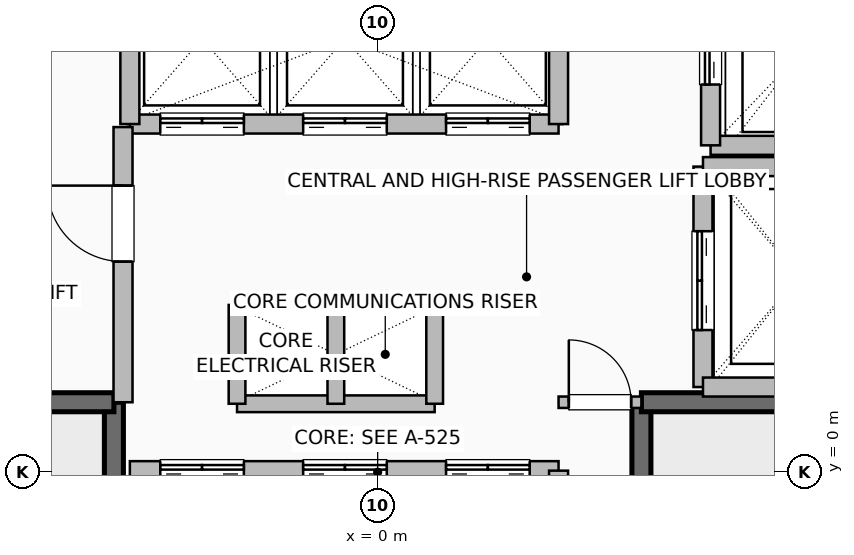
"""IFC4 building model, lengths in metres.
Left out: names, types, materials, properties, quantities, classifications, styles, units other than length and angle.
Written with IfcOpenShell. Run it as: python <this file> out.ifc"""

import sys

from ifc_helpers import new_model, si_unit, direction, frame, frame_2d, origin, place, context, subcontext, project, spatial, rectangle, extrude, element, fill, save


model = new_model("IFC4")
c1 = context("Model", 3, precision=1e-05, world=origin(), true_north=direction((0.0, 1.0)))
c2 = subcontext(c1, "Body", "Model", "MODEL_VIEW")
j1 = project(units=[si_unit("LENGTHUNIT", "METRE"), si_unit("PLANEANGLEUNIT", "RADIAN")], contexts=[c1])
p1 = place(None, origin())
s1 = spatial("IfcSite", under=j1, at=p1, CompositionType="ELEMENT")
p2 = place(p1, origin())
s2 = spatial("IfcBuilding", under=s1, at=p2, CompositionType="ELEMENT")
p3 = place(p2, frame((0.0, 0.0, 97.6)))
s3 = spatial("IfcBuildingStorey", under=s2, at=p3, CompositionType="ELEMENT", Elevation=97.6)
p4 = place(p3, frame((-3.47, -6.8, 0.0), z_axis=(0.0, 0.0, 1.0), x_axis=(0.0, 1.0, 0.0)))
e1 = element("IfcWall", 1, at=p4, inside=s3, PredefinedType="SHEAR", context=c2, shape_type="SweptSolid", body=[
    extrude(rectangle(XDim=7.72, YDim=0.25, at=frame_2d((3.86, 0.0))), origin(), (0.0, 0.0, 1.0), 3.36),
])
p5 = place(p3, frame((-6.8, 0.92, 0.0), z_axis=(0.0, 0.0, 1.0), x_axis=(1.0, 0.0, 0.0)))
e2 = element("IfcWall", 2, at=p5, inside=s3, PredefinedType="SHEAR", context=c2, shape_type="SweptSolid", body=[
    extrude(rectangle(XDim=3.33, YDim=0.25, at=frame_2d((1.665, 0.0))), origin(), (0.0, 0.0, 1.0), 3.36),
])
p6 = place(p3, frame((3.47, -6.8, 0.0), z_axis=(0.0, 0.0, 1.0), x_axis=(0.0, 1.0, 0.0)))
e3 = element("IfcWall", 3, at=p6, inside=s3, PredefinedType="SHEAR", context=c2, shape_type="SweptSolid", body=[
    extrude(rectangle(XDim=7.72, YDim=0.25, at=frame_2d((3.86, 0.0))), origin(), (0.0, 0.0, 1.0), 3.36),
])
p7 = place(p3, frame((3.47, 0.92, 0.0), z_axis=(0.0, 0.0, 1.0), x_axis=(1.0, 0.0, 0.0)))
e4 = element("IfcWall", 4, at=p7, inside=s3, PredefinedType="SHEAR", context=c2, shape_type="SweptSolid", body=[
    extrude(rectangle(XDim=3.33, YDim=0.25, at=frame_2d((1.665, 0.0))), origin(), (0.0, 0.0, 1.0), 3.36),
])
for number, where, z_axis, x_axis in (
    (5, (-1.85, 2.2, 0.0), (0.0, 0.0, 1.0), (1.0, 0.0, 0.0)),
    (6, (-1.85, 0.9, 0.0), (0.0, 0.0, 1.0), (1.0, 0.0, 0.0)),
):
    element("IfcWall", number, at=place(p3, frame(where, z_axis=z_axis, x_axis=x_axis)), inside=s3, PredefinedType="PARTITIONING", context=c2, shape_type="SweptSolid", body=[
        extrude(rectangle(XDim=2.6, YDim=0.22, at=frame_2d((1.3, 0.0))), origin(), (0.0, 0.0, 1.0), 3.36),
    ])
for number, where, z_axis, x_axis in (
    (7, (-0.55, 0.9, 0.0), (0.0, 0.0, 1.0), (0.0, 1.0, 0.0)),
    (8, (0.75, 0.9, 0.0), (0.0, 0.0, 1.0), (0.0, 1.0, 0.0)),
    (9, (-1.85, 0.9, 0.0), (0.0, 0.0, 1.0), (0.0, 1.0, 0.0)),
):
    element("IfcWall", number, at=place(p3, frame(where, z_axis=z_axis, x_axis=x_axis)), inside=s3, PredefinedType="PARTITIONING", context=c2, shape_type="SweptSolid", body=[
        extrude(rectangle(XDim=1.3, YDim=0.22, at=frame_2d((0.65, 0.0))), origin(), (0.0, 0.0, 1.0), 3.36),
    ])
p8 = place(p3, frame((-3.26, 0.02, 0.0), z_axis=(0.0, 0.0, 1.0), x_axis=(1.0, 0.0, 0.0)))
e10 = element("IfcWall", 10, at=p8, inside=s3, PredefinedType="SHEAR", context=c2, shape_type="SweptSolid", body=[
    extrude(rectangle(XDim=5.64, YDim=0.25, at=frame_2d((2.82, 0.0))), origin(), (0.0, 0.0, 1.0), 3.36),
])
p9 = place(p8, frame((0.4, 0.0, 0.0)))
e11 = element("IfcOpeningElement", 11, at=p9, cuts=e10, PredefinedType="OPENING", context=c2, shape_type="SweptSolid", body=[
    extrude(rectangle(XDim=1.1, YDim=2.2, at=frame_2d((0.55, 1.1))), frame((0.0, 0.135, 0.0), z_axis=(0.0, -1.0, 0.0), x_axis=(1.0, 0.0, 0.0)), (0.0, 0.0, 1.0), 0.27),
])
p10 = place(p8, frame((2.28, 0.0, 0.0)))
e12 = element("IfcOpeningElement", 12, at=p10, cuts=e10, PredefinedType="OPENING", context=c2, shape_type="SweptSolid", body=[
    extrude(rectangle(XDim=1.1, YDim=2.2, at=frame_2d((0.55, 1.1))), frame((0.0, 0.135, 0.0), z_axis=(0.0, -1.0, 0.0), x_axis=(1.0, 0.0, 0.0)), (0.0, 0.0, 1.0), 0.27),
])
p11 = place(p8, frame((4.16, 0.0, 0.0)))
e13 = element("IfcOpeningElement", 13, at=p11, cuts=e10, PredefinedType="OPENING", context=c2, shape_type="SweptSolid", body=[
    extrude(rectangle(XDim=1.1, YDim=2.2, at=frame_2d((0.55, 1.1))), frame((0.0, 0.135, 0.0), z_axis=(0.0, -1.0, 0.0), x_axis=(1.0, 0.0, 0.0)), (0.0, 0.0, 1.0), 0.27),
])
p12 = place(p3, frame((2.38, -2.42, 0.0), z_axis=(0.0, 0.0, 1.0), x_axis=(0.0, 1.0, 0.0)))
e14 = element("IfcWall", 14, at=p12, inside=s3, PredefinedType="SHEAR", context=c2, shape_type="SweptSolid", body=[
    extrude(rectangle(XDim=2.44, YDim=0.25, at=frame_2d((1.22, 0.0))), origin(), (0.0, 0.0, 1.0), 3.36),
])
p13 = place(p3, frame((-3.26, 4.58, 0.0), z_axis=(0.0, 0.0, 1.0), x_axis=(1.0, 0.0, 0.0)))
e15 = element("IfcWall", 15, at=p13, inside=s3, PredefinedType="SHEAR", context=c2, shape_type="SweptSolid", body=[
    extrude(rectangle(XDim=5.64, YDim=0.25, at=frame_2d((2.82, 0.0))), origin(), (0.0, 0.0, 1.0), 3.36),
])
p14 = place(p13, frame((0.4, 0.0, 0.0)))
e16 = element("IfcOpeningElement", 16, at=p14, cuts=e15, PredefinedType="OPENING", context=c2, shape_type="SweptSolid", body=[
    extrude(rectangle(XDim=1.1, YDim=2.2, at=frame_2d((0.55, 1.1))), frame((0.0, 0.135, 0.0), z_axis=(0.0, -1.0, 0.0), x_axis=(1.0, 0.0, 0.0)), (0.0, 0.0, 1.0), 0.27),
])
p15 = place(p13, frame((2.28, 0.0, 0.0)))
e17 = element("IfcOpeningElement", 17, at=p15, cuts=e15, PredefinedType="OPENING", context=c2, shape_type="SweptSolid", body=[
    extrude(rectangle(XDim=1.1, YDim=2.2, at=frame_2d((0.55, 1.1))), frame((0.0, 0.135, 0.0), z_axis=(0.0, -1.0, 0.0), x_axis=(1.0, 0.0, 0.0)), (0.0, 0.0, 1.0), 0.27),
])
p16 = place(p13, frame((4.16, 0.0, 0.0)))
e18 = element("IfcOpeningElement", 18, at=p16, cuts=e15, PredefinedType="OPENING", context=c2, shape_type="SweptSolid", body=[
    extrude(rectangle(XDim=1.1, YDim=2.2, at=frame_2d((0.55, 1.1))), frame((0.0, 0.135, 0.0), z_axis=(0.0, -1.0, 0.0), x_axis=(1.0, 0.0, 0.0)), (0.0, 0.0, 1.0), 0.27),
])
for number, where, z_axis, x_axis in (
    (19, (-3.26, 4.58, 0.0), (0.0, 0.0, 1.0), (0.0, 1.0, 0.0)),
    (20, (2.38, 4.58, 0.0), (0.0, 0.0, 1.0), (0.0, 1.0, 0.0)),
):
    element("IfcWall", number, at=place(p3, frame(where, z_axis=z_axis, x_axis=x_axis)), inside=s3, PredefinedType="SHEAR", context=c2, shape_type="SweptSolid", body=[
        extrude(rectangle(XDim=2.22, YDim=0.25, at=frame_2d((1.11, 0.0))), origin(), (0.0, 0.0, 1.0), 3.36),
    ])
p17 = place(p3, frame((4.38, 4.3, 0.0), z_axis=(0.0, 0.0, 1.0), x_axis=(1.0, 0.0, 0.0)))
e21 = element("IfcWall", 21, at=p17, inside=s3, PredefinedType="SHEAR", context=c2, shape_type="SweptSolid", body=[
    extrude(rectangle(XDim=2.42, YDim=0.25, at=frame_2d((1.21, 0.0))), origin(), (0.0, 0.0, 1.0), 3.36),
])
p18 = place(p3, frame((4.38, 4.3, 0.0), z_axis=(0.0, 0.0, 1.0), x_axis=(0.0, 1.0, 0.0)))
e22 = element("IfcWall", 22, at=p18, inside=s3, PredefinedType="SHEAR", context=c2, shape_type="SweptSolid", body=[
    extrude(rectangle(XDim=2.5, YDim=0.25, at=frame_2d((1.25, 0.0))), origin(), (0.0, 0.0, 1.0), 3.36),
])
p19 = place(p18, frame((0.8, 0.0, 0.0)))
e23 = element("IfcOpeningElement", 23, at=p19, cuts=e22, PredefinedType="OPENING", context=c2, shape_type="SweptSolid", body=[
    extrude(rectangle(XDim=1.2, YDim=2.2, at=frame_2d((0.6, 1.1))), frame((0.0, 0.135, 0.0), z_axis=(0.0, -1.0, 0.0), x_axis=(1.0, 0.0, 0.0)), (0.0, 0.0, 1.0), 0.27),
])
p20 = place(p3, frame((4.28, 1.12, 0.0), z_axis=(0.0, 0.0, 1.0), x_axis=(0.0, 1.0, 0.0)))
e24 = element("IfcWall", 24, at=p20, inside=s3, PredefinedType="SHEAR", context=c2, shape_type="SweptSolid", body=[
    extrude(rectangle(XDim=2.9, YDim=0.25, at=frame_2d((1.45, 0.0))), origin(), (0.0, 0.0, 1.0), 3.36),
])
p21 = place(p20, frame((0.75, 0.0, 0.0)))
e25 = element("IfcOpeningElement", 25, at=p21, cuts=e24, PredefinedType="OPENING", context=c2, shape_type="SweptSolid", body=[
    extrude(rectangle(XDim=1.3, YDim=2.3, at=frame_2d((0.65, 1.15))), frame((0.0, 0.135, 0.0), z_axis=(0.0, -1.0, 0.0), x_axis=(1.0, 0.0, 0.0)), (0.0, 0.0, 1.0), 0.27),
])
for number, where, z_axis, x_axis in (
    (26, (4.28, 1.12, 0.0), (0.0, 0.0, 1.0), (1.0, 0.0, 0.0)),
    (27, (4.28, 4.02, 0.0), (0.0, 0.0, 1.0), (1.0, 0.0, 0.0)),
):
    element("IfcWall", number, at=place(p3, frame(where, z_axis=z_axis, x_axis=x_axis)), inside=s3, PredefinedType="SHEAR", context=c2, shape_type="SweptSolid", body=[
        extrude(rectangle(XDim=2.52, YDim=0.25, at=frame_2d((1.26, 0.0))), origin(), (0.0, 0.0, 1.0), 3.36),
    ])
p22 = place(p3, frame((-3.35, 0.92, 0.0), z_axis=(0.0, 0.0, 1.0), x_axis=(0.0, 1.0, 0.0)))
e28 = element("IfcWall", 28, at=p22, inside=s3, PredefinedType="SHEAR", context=c2, shape_type="SweptSolid", body=[
    extrude(rectangle(XDim=3.62, YDim=0.25, at=frame_2d((1.81, 0.0))), origin(), (0.0, 0.0, 1.0), 3.36),
])
p23 = place(p22, frame((1.85, 0.0, 0.0)))
e29 = element("IfcOpeningElement", 29, at=p23, cuts=e28, PredefinedType="OPENING", context=c2, shape_type="SweptSolid", body=[
    extrude(rectangle(XDim=1.0, YDim=2.08, at=frame_2d((0.5, 1.04))), frame((0.0, 0.135, 0.0), z_axis=(0.0, -1.0, 0.0), x_axis=(1.0, 0.0, 0.0)), (0.0, 0.0, 1.0), 0.27),
])
p24 = place(p3, frame((2.38, 0.92, 0.0), z_axis=(0.0, 0.0, 1.0), x_axis=(1.0, 0.0, 0.0)))
e30 = element("IfcWall", 30, at=p24, inside=s3, PredefinedType="PARTITIONING", context=c2, shape_type="SweptSolid", body=[
    extrude(rectangle(XDim=1.09, YDim=0.15, at=frame_2d((0.545, 0.0))), origin(), (0.0, 0.0, 1.0), 3.36),
])
p25 = place(p24, frame((0.135, 0.0, 0.0)))
e31 = element("IfcOpeningElement", 31, at=p25, cuts=e30, PredefinedType="OPENING", context=c2, shape_type="SweptSolid", body=[
    extrude(rectangle(XDim=0.82, YDim=2.05, at=frame_2d((0.41, 1.025))), frame((0.0, 0.085, 0.0), z_axis=(0.0, -1.0, 0.0), x_axis=(1.0, 0.0, 0.0)), (0.0, 0.0, 1.0), 0.17),
])
p26 = place(p9, origin())
e32 = element("IfcDoor", 32, at=p26, inside=s3, OperationType="DOUBLE_DOOR_SLIDING", PredefinedType="DOOR", context=c2, shape_type="SweptSolid", body=[
    extrude(rectangle(XDim=1.1, YDim=2.2, at=frame_2d((0.55, 1.1))), frame((0.0, 0.025, 0.0), z_axis=(0.0, -1.0, 0.0), x_axis=(1.0, 0.0, 0.0)), (0.0, 0.0, 1.0), 0.05),
])
fill(e11, e32)
p27 = place(p10, origin())
e33 = element("IfcDoor", 33, at=p27, inside=s3, OperationType="DOUBLE_DOOR_SLIDING", PredefinedType="DOOR", context=c2, shape_type="SweptSolid", body=[
    extrude(rectangle(XDim=1.1, YDim=2.2, at=frame_2d((0.55, 1.1))), frame((0.0, 0.025, 0.0), z_axis=(0.0, -1.0, 0.0), x_axis=(1.0, 0.0, 0.0)), (0.0, 0.0, 1.0), 0.05),
])
fill(e12, e33)
p28 = place(p11, origin())
e34 = element("IfcDoor", 34, at=p28, inside=s3, OperationType="DOUBLE_DOOR_SLIDING", PredefinedType="DOOR", context=c2, shape_type="SweptSolid", body=[
    extrude(rectangle(XDim=1.1, YDim=2.2, at=frame_2d((0.55, 1.1))), frame((0.0, 0.025, 0.0), z_axis=(0.0, -1.0, 0.0), x_axis=(1.0, 0.0, 0.0)), (0.0, 0.0, 1.0), 0.05),
])
fill(e13, e34)
p29 = place(p14, origin())
e35 = element("IfcDoor", 35, at=p29, inside=s3, OperationType="DOUBLE_DOOR_SLIDING", PredefinedType="DOOR", context=c2, shape_type="SweptSolid", body=[
    extrude(rectangle(XDim=1.1, YDim=2.2, at=frame_2d((0.55, 1.1))), frame((0.0, 0.025, 0.0), z_axis=(0.0, -1.0, 0.0), x_axis=(1.0, 0.0, 0.0)), (0.0, 0.0, 1.0), 0.05),
])
fill(e16, e35)
p30 = place(p15, origin())
e36 = element("IfcDoor", 36, at=p30, inside=s3, OperationType="DOUBLE_DOOR_SLIDING", PredefinedType="DOOR", context=c2, shape_type="SweptSolid", body=[
    extrude(rectangle(XDim=1.1, YDim=2.2, at=frame_2d((0.55, 1.1))), frame((0.0, 0.025, 0.0), z_axis=(0.0, -1.0, 0.0), x_axis=(1.0, 0.0, 0.0)), (0.0, 0.0, 1.0), 0.05),
])
fill(e17, e36)
p31 = place(p16, origin())
e37 = element("IfcDoor", 37, at=p31, inside=s3, OperationType="DOUBLE_DOOR_SLIDING", PredefinedType="DOOR", context=c2, shape_type="SweptSolid", body=[
    extrude(rectangle(XDim=1.1, YDim=2.2, at=frame_2d((0.55, 1.1))), frame((0.0, 0.025, 0.0), z_axis=(0.0, -1.0, 0.0), x_axis=(1.0, 0.0, 0.0)), (0.0, 0.0, 1.0), 0.05),
])
fill(e18, e37)
p32 = place(p19, origin())
e38 = element("IfcDoor", 38, at=p32, inside=s3, OperationType="DOUBLE_DOOR_SLIDING", PredefinedType="DOOR", context=c2, shape_type="SweptSolid", body=[
    extrude(rectangle(XDim=1.2, YDim=2.2, at=frame_2d((0.6, 1.1))), frame((0.0, 0.025, 0.0), z_axis=(0.0, -1.0, 0.0), x_axis=(1.0, 0.0, 0.0)), (0.0, 0.0, 1.0), 0.05),
])
fill(e23, e38)
p33 = place(p21, origin())
e39 = element("IfcDoor", 39, at=p33, inside=s3, OperationType="DOUBLE_DOOR_SLIDING", PredefinedType="DOOR", context=c2, shape_type="SweptSolid", body=[
    extrude(rectangle(XDim=1.3, YDim=2.3, at=frame_2d((0.65, 1.15))), frame((0.0, 0.025, 0.0), z_axis=(0.0, -1.0, 0.0), x_axis=(1.0, 0.0, 0.0)), (0.0, 0.0, 1.0), 0.05),
])
fill(e25, e39)
p34 = place(p23, origin())
e40 = element("IfcDoor", 40, at=p34, inside=s3, OperationType="SINGLE_SWING_RIGHT", PredefinedType="DOOR", context=c2, shape_type="SweptSolid", body=[
    extrude(rectangle(XDim=1.0, YDim=2.08, at=frame_2d((0.5, 1.04))), frame((0.0, 0.025, 0.0), z_axis=(0.0, -1.0, 0.0), x_axis=(1.0, 0.0, 0.0)), (0.0, 0.0, 1.0), 0.05),
])
fill(e29, e40)
p35 = place(p25, origin())
e41 = element("IfcDoor", 41, at=p35, inside=s3, OperationType="SINGLE_SWING_LEFT", PredefinedType="DOOR", context=c2, shape_type="SweptSolid", body=[
    extrude(rectangle(XDim=0.82, YDim=2.05, at=frame_2d((0.41, 1.025))), frame((0.0, 0.025, 0.0), z_axis=(0.0, -1.0, 0.0), x_axis=(1.0, 0.0, 0.0)), (0.0, 0.0, 1.0), 0.05),
])
fill(e31, e41)
save(model, sys.argv[1])
